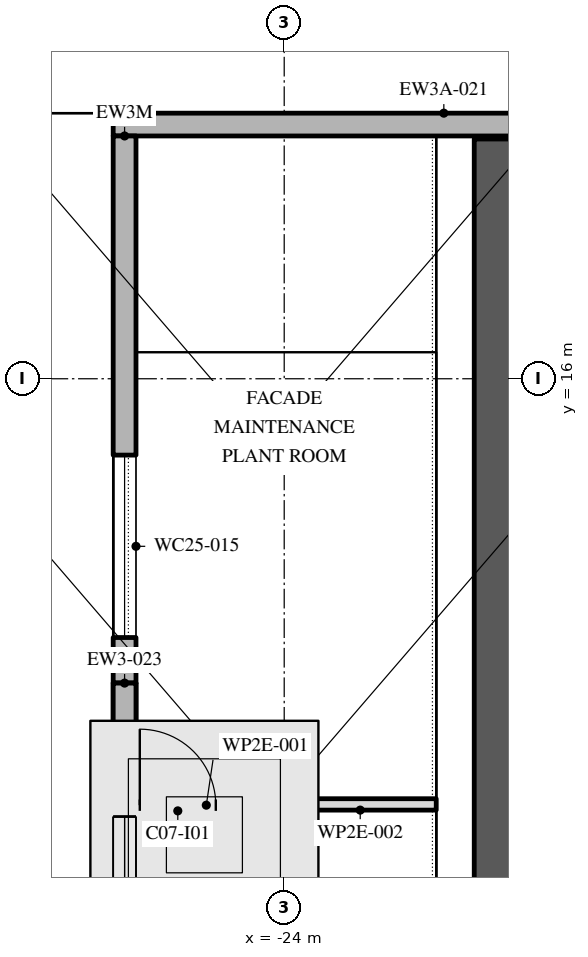
"""IFC4 building model, lengths in metres.
Left out: names, types, materials, properties, quantities, classifications, styles, units other than length and angle.
Written with IfcOpenShell. Run it as: python <this file> out.ifc"""

import sys

from ifc_helpers import new_model, si_unit, direction, frame, frame_2d, origin, place, context, subcontext, project, spatial, polyline, rectangle, outline, extrude, element, fill, save


model = new_model("IFC4")
c1 = context("Model", 3, precision=1e-05, world=origin(), true_north=direction((0.0, 1.0)))
c2 = subcontext(c1, "Body", "Model", "MODEL_VIEW")
j1 = project(units=[si_unit("LENGTHUNIT", "METRE"), si_unit("PLANEANGLEUNIT", "RADIAN")], contexts=[c1])
p1 = place(None, origin())
s1 = spatial("IfcSite", under=j1, at=p1, CompositionType="ELEMENT")
p2 = place(p1, origin())
s2 = spatial("IfcBuilding", under=s1, at=p2, CompositionType="ELEMENT")
p3 = place(p2, frame((0.0, 0.0, 394.2)))
s3 = spatial("IfcBuildingStorey", under=s2, at=p3, CompositionType="ELEMENT", Elevation=394.2)
p4 = place(p3, frame((-17.55, 19.344, 0.0), z_axis=(0.0, 0.0, 1.0), x_axis=(-1.0, 0.0, 0.0)))
e1 = element("IfcWall", 1, at=p4, inside=s3, PredefinedType="STANDARD", context=c2, shape_type="SweptSolid", body=[
    extrude(rectangle(XDim=8.7, YDim=0.3, at=frame_2d((4.35, 0.0))), origin(), (0.0, 0.0, 1.0), 2.2),
])
p5 = place(p3, frame((-26.1, 19.194, 0.0), z_axis=(0.0, 0.0, 1.0), x_axis=(0.0, -1.0, 0.0)))
e2 = element("IfcWall", 2, at=p5, inside=s3, PredefinedType="STANDARD", context=c2, shape_type="SweptSolid", body=[
    extrude(outline(polyline([(0.0, 0.0), (7.198, 0.0), (7.198, 4.0), (2.519, 4.0), (0.0, 2.301), (0.0, 0.0)])), frame((0.0, 0.15, 0.0), z_axis=(0.0, -1.0, 0.0), x_axis=(1.0, 0.0, 0.0)), (0.0, 0.0, 1.0), 0.3),
])
p6 = place(p5, frame((4.198, 0.0, 0.8)))
e3 = element("IfcOpeningElement", 3, at=p6, cuts=e2, PredefinedType="OPENING", context=c2, shape_type="SweptSolid", body=[
    extrude(outline(polyline([(0.0, 0.0), (2.4, 0.0), (2.4, 1.25), (2.377, 1.488), (2.31, 1.717), (2.2, 1.929), (2.051, 2.116), (1.87, 2.272), (1.663, 2.391), (1.437, 2.468), (1.2, 2.5), (0.963, 2.468), (0.737, 2.391), (0.53, 2.272), (0.349, 2.116), (0.2, 1.929), (0.09, 1.717), (0.023, 1.488), (0.0, 1.25), (0.0, 0.0)])), frame((0.0, 0.16, 0.0), z_axis=(0.0, -1.0, 0.0), x_axis=(1.0, 0.0, 0.0)), (0.0, 0.0, 1.0), 0.32),
])
p7 = place(p3, frame((-26.1, 11.996, 0.0), z_axis=(0.0, 0.0, 1.0), x_axis=(0.0, -1.0, 0.0)))
e4 = element("IfcWall", 4, at=p7, inside=s3, PredefinedType="STANDARD", context=c2, shape_type="SweptSolid", body=[
    extrude(rectangle(XDim=7.198, YDim=0.3, at=frame_2d((3.599, 0.0))), origin(), (0.0, 0.0, 1.0), 4.0),
])
p8 = place(p7, frame((1.756, 0.0, 0.8)))
e5 = element("IfcOpeningElement", 5, at=p8, cuts=e4, PredefinedType="OPENING", context=c2, shape_type="SweptSolid", body=[
    extrude(outline(polyline([(0.0, 0.0), (2.4, 0.0), (2.4, 1.25), (2.377, 1.488), (2.31, 1.717), (2.2, 1.929), (2.051, 2.116), (1.87, 2.272), (1.663, 2.391), (1.437, 2.468), (1.2, 2.5), (0.963, 2.468), (0.737, 2.391), (0.53, 2.272), (0.349, 2.116), (0.2, 1.929), (0.09, 1.717), (0.023, 1.488), (0.0, 1.25), (0.0, 0.0)])), frame((0.0, 0.16, 0.0), z_axis=(0.0, -1.0, 0.0), x_axis=(1.0, 0.0, 0.0)), (0.0, 0.0, 1.0), 0.32),
])
p9 = place(p7, frame((4.456, 0.0, 0.8)))
e6 = element("IfcOpeningElement", 6, at=p9, cuts=e4, PredefinedType="OPENING", context=c2, shape_type="SweptSolid", body=[
    extrude(outline(polyline([(0.0, 0.0), (2.4, 0.0), (2.4, 1.25), (2.377, 1.488), (2.31, 1.717), (2.2, 1.929), (2.051, 2.116), (1.87, 2.272), (1.663, 2.391), (1.437, 2.468), (1.2, 2.5), (0.963, 2.468), (0.737, 2.391), (0.53, 2.272), (0.349, 2.116), (0.2, 1.929), (0.09, 1.717), (0.023, 1.488), (0.0, 1.25), (0.0, 0.0)])), frame((0.0, 0.16, 0.0), z_axis=(0.0, -1.0, 0.0), x_axis=(1.0, 0.0, 0.0)), (0.0, 0.0, 1.0), 0.32),
])
p10 = place(p3, frame((-26.1, 11.996, 4.0), z_axis=(0.0, 0.0, 1.0), x_axis=(0.0, -1.0, 0.0)))
e7 = element("IfcWall", 7, at=p10, inside=s3, PredefinedType="STANDARD", context=c2, shape_type="SweptSolid", body=[
    extrude(outline(polyline([(0.0, 0.0), (7.198, 0.0), (7.198, 8.011), (0.0, 3.156), (0.0, 0.0)])), frame((0.0, 0.15, 0.0), z_axis=(0.0, -1.0, 0.0), x_axis=(1.0, 0.0, 0.0)), (0.0, 0.0, 1.0), 0.3),
])
p11 = place(p10, frame((1.756, 0.0, 0.8)))
e8 = element("IfcOpeningElement", 8, at=p11, cuts=e7, PredefinedType="OPENING", context=c2, shape_type="SweptSolid", body=[
    extrude(outline(polyline([(0.0, 0.0), (2.4, 0.0), (2.4, 1.0), (2.376, 1.221), (2.304, 1.431), (2.188, 1.621), (2.034, 1.781), (1.849, 1.904), (1.641, 1.983), (1.422, 2.016), (1.2, 2.0), (0.978, 2.016), (0.759, 1.983), (0.551, 1.904), (0.366, 1.781), (0.212, 1.621), (0.096, 1.431), (0.024, 1.221), (0.0, 1.0), (0.0, 0.0)])), frame((0.0, 0.16, 0.0), z_axis=(0.0, -1.0, 0.0), x_axis=(1.0, 0.0, 0.0)), (0.0, 0.0, 1.0), 0.32),
])
p12 = place(p10, frame((4.456, 0.0, 0.8)))
e9 = element("IfcOpeningElement", 9, at=p12, cuts=e7, PredefinedType="OPENING", context=c2, shape_type="SweptSolid", body=[
    extrude(outline(polyline([(0.0, 0.0), (2.4, 0.0), (2.4, 2.0), (2.379, 2.305), (2.318, 2.605), (2.216, 2.894), (2.077, 3.166), (1.902, 3.417), (1.695, 3.643), (1.46, 3.838), (1.2, 4.0), (0.94, 3.838), (0.705, 3.643), (0.498, 3.417), (0.323, 3.166), (0.184, 2.894), (0.082, 2.605), (0.021, 2.305), (0.0, 2.0), (0.0, 0.0)])), frame((0.0, 0.16, 0.0), z_axis=(0.0, -1.0, 0.0), x_axis=(1.0, 0.0, 0.0)), (0.0, 0.0, 1.0), 0.32),
])
p13 = place(p3, frame((-21.25, -2.45, 0.0), z_axis=(0.0, 0.0, 1.0), x_axis=(0.0, 1.0, 0.0)))
e10 = element("IfcWall", 10, at=p13, inside=s3, PredefinedType="SHEAR", context=c2, shape_type="SweptSolid", body=[
    extrude(outline(polyline([(0.0, 0.0), (21.604, 0.0), (21.604, 0.754), (16.939, 3.9), (0.0, 3.9), (0.0, 0.0)])), frame((0.0, 0.25, 0.0), z_axis=(0.0, -1.0, 0.0), x_axis=(1.0, 0.0, 0.0)), (0.0, 0.0, 1.0), 0.5),
])
p14 = place(p13, frame((5.05, 0.0, 0.0)))
e11 = element("IfcOpeningElement", 11, at=p14, cuts=e10, PredefinedType="OPENING", context=c2, shape_type="SweptSolid", body=[
    extrude(rectangle(XDim=1.2, YDim=2.1, at=frame_2d((0.6, 1.05))), frame((0.0, 0.26, 0.0), z_axis=(0.0, -1.0, 0.0), x_axis=(1.0, 0.0, 0.0)), (0.0, 0.0, 1.0), 0.52),
])
p15 = place(p3, frame((-26.05, 10.39, 0.0), z_axis=(0.0, 0.0, 1.0), x_axis=(1.0, 0.0, 0.0)))
e12 = element("IfcWall", 12, at=p15, inside=s3, PredefinedType="PARTITIONING", context=c2, shape_type="SweptSolid", body=[
    extrude(rectangle(XDim=2.05, YDim=0.15, at=frame_2d((1.025, 0.0))), origin(), (0.0, 0.0, 1.0), 3.9),
])
p16 = place(p15, frame((0.15, 0.0, 0.0)))
e13 = element("IfcOpeningElement", 13, at=p16, cuts=e12, PredefinedType="OPENING", context=c2, shape_type="SweptSolid", body=[
    extrude(rectangle(XDim=1.0, YDim=2.1, at=frame_2d((0.5, 1.05))), frame((0.0, 0.085, 0.0), z_axis=(0.0, -1.0, 0.0), x_axis=(1.0, 0.0, 0.0)), (0.0, 0.0, 1.0), 0.17),
])
p17 = place(p3, frame((-24.0, 10.4, 0.0), z_axis=(0.0, 0.0, 1.0), x_axis=(1.0, 0.0, 0.0)))
e14 = element("IfcWall", 14, at=p17, inside=s3, PredefinedType="PARTITIONING", context=c2, shape_type="SweptSolid", body=[
    extrude(rectangle(XDim=2.0, YDim=0.15, at=frame_2d((1.0, 0.0))), origin(), (0.0, 0.0, 1.0), 3.9),
])
p18 = place(p6, origin())
e15 = element("IfcWindow", 15, at=p18, inside=s3, PartitioningType="DOUBLE_PANEL_VERTICAL", PredefinedType="WINDOW", context=c2, shape_type="SweptSolid", body=[
    extrude(outline(polyline([(0.0, 0.0), (2.4, 0.0), (2.4, 1.25), (2.377, 1.488), (2.31, 1.717), (2.2, 1.929), (2.051, 2.116), (1.87, 2.272), (1.663, 2.391), (1.437, 2.468), (1.2, 2.5), (0.963, 2.468), (0.737, 2.391), (0.53, 2.272), (0.349, 2.116), (0.2, 1.929), (0.09, 1.717), (0.023, 1.488), (0.0, 1.25), (0.0, 0.0)])), frame((0.0, 0.03, 0.0), z_axis=(0.0, -1.0, 0.0), x_axis=(1.0, 0.0, 0.0)), (0.0, 0.0, 1.0), 0.06),
])
fill(e3, e15)
p19 = place(p8, origin())
e16 = element("IfcWindow", 16, at=p19, inside=s3, PartitioningType="DOUBLE_PANEL_VERTICAL", PredefinedType="WINDOW", context=c2, shape_type="SweptSolid", body=[
    extrude(outline(polyline([(0.0, 0.0), (2.4, 0.0), (2.4, 1.25), (2.377, 1.488), (2.31, 1.717), (2.2, 1.929), (2.051, 2.116), (1.87, 2.272), (1.663, 2.391), (1.437, 2.468), (1.2, 2.5), (0.963, 2.468), (0.737, 2.391), (0.53, 2.272), (0.349, 2.116), (0.2, 1.929), (0.09, 1.717), (0.023, 1.488), (0.0, 1.25), (0.0, 0.0)])), frame((0.0, 0.03, 0.0), z_axis=(0.0, -1.0, 0.0), x_axis=(1.0, 0.0, 0.0)), (0.0, 0.0, 1.0), 0.06),
])
fill(e5, e16)
p20 = place(p11, origin())
e17 = element("IfcWindow", 17, at=p20, inside=s3, PartitioningType="DOUBLE_PANEL_VERTICAL", PredefinedType="WINDOW", context=c2, shape_type="SweptSolid", body=[
    extrude(outline(polyline([(0.0, 0.0), (2.4, 0.0), (2.4, 1.0), (2.376, 1.221), (2.304, 1.431), (2.188, 1.621), (2.034, 1.781), (1.849, 1.904), (1.641, 1.983), (1.422, 2.016), (1.2, 2.0), (0.978, 2.016), (0.759, 1.983), (0.551, 1.904), (0.366, 1.781), (0.212, 1.621), (0.096, 1.431), (0.024, 1.221), (0.0, 1.0), (0.0, 0.0)])), frame((0.0, 0.03, 0.0), z_axis=(0.0, -1.0, 0.0), x_axis=(1.0, 0.0, 0.0)), (0.0, 0.0, 1.0), 0.06),
])
fill(e8, e17)
p21 = place(p16, origin())
e18 = element("IfcDoor", 18, at=p21, inside=s3, OperationType="SINGLE_SWING_RIGHT", PredefinedType="DOOR", context=c2, shape_type="SweptSolid", body=[
    extrude(rectangle(XDim=1.0, YDim=2.1, at=frame_2d((0.5, 1.05))), frame((0.0, 0.025, 0.0), z_axis=(0.0, -1.0, 0.0), x_axis=(1.0, 0.0, 0.0)), (0.0, 0.0, 1.0), 0.05),
])
fill(e13, e18)
save(model, sys.argv[1])
